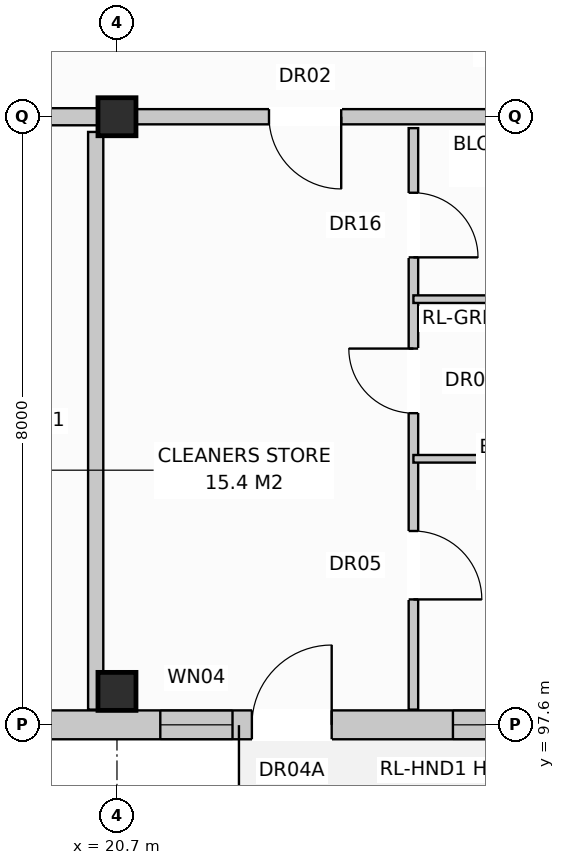
"""IFC4 building model, lengths in metres.
Left out: names, types, materials, properties, quantities, classifications, styles, units other than length and angle.
Written with IfcOpenShell. Run it as: python <this file> out.ifc"""

import sys

from ifc_helpers import new_model, si_unit, direction, frame, frame_2d, origin, origin_with_axes, origin_2d, place, context, subcontext, project, spatial, rectangle, extrude, element, fill, save


model = new_model("IFC4")
c1 = context("Model", 3, precision=1e-05, world=origin(), true_north=direction((0.0, 1.0)))
c2 = subcontext(c1, "Body", "Model", "MODEL_VIEW")
j1 = project(units=[si_unit("LENGTHUNIT", "METRE"), si_unit("PLANEANGLEUNIT", "RADIAN")], contexts=[c1])
p1 = place(None, origin())
s1 = spatial("IfcSite", under=j1, at=p1, CompositionType="ELEMENT")
p2 = place(p1, origin())
s2 = spatial("IfcBuilding", under=s1, at=p2, CompositionType="ELEMENT")
p3 = place(p2, frame((0.0, 0.0, 4.4)))
s3 = spatial("IfcBuildingStorey", under=s2, at=p3, CompositionType="ELEMENT", Elevation=4.4)
for number, where, z_axis, x_axis in (
    (1, (20.7, 98.04, 0.0), (0.0, 0.0, 1.0), (1.0, 0.0, 0.0)),
    (2, (20.7, 105.6, 0.0), (0.0, 0.0, 1.0), (1.0, 0.0, 0.0)),
):
    element("IfcColumn", number, at=place(p3, frame(where, z_axis=z_axis, x_axis=x_axis)), inside=s3, PredefinedType="COLUMN", context=c2, shape_type="SweptSolid", body=[
        extrude(rectangle(XDim=0.5, YDim=0.5, at=origin_2d()), origin(), (0.0, 0.0, 1.0), 3.6),
    ])
p4 = place(p3, frame((10.65, 97.6, 0.0), z_axis=(0.0, 0.0, 1.0), x_axis=(1.0, 0.0, 0.0)))
e3 = element("IfcWall", 3, at=p4, inside=s3, PredefinedType="STANDARD", context=c2, shape_type="SweptSolid", body=[
    extrude(rectangle(XDim=17.4, YDim=0.38, at=frame_2d((8.7, 0.0))), origin(), (0.0, 0.0, 1.0), 3.33),
])
p5 = place(p4, frame((11.825, 0.0, 0.0)))
e4 = element("IfcOpeningElement", 4, at=p5, cuts=e3, PredefinedType="OPENING", context=c2, shape_type="SweptSolid", body=[
    extrude(rectangle(XDim=1.05, YDim=2.12, at=frame_2d((0.525, 1.06))), frame((0.0, 0.202, 0.0), z_axis=(0.0, -1.0, 0.0), x_axis=(1.0, 0.0, 0.0)), (0.0, 0.0, 1.0), 0.404),
])
p6 = place(p4, frame((10.62, 0.0, 0.9)))
e5 = element("IfcOpeningElement", 5, at=p6, cuts=e3, PredefinedType="OPENING", context=c2, shape_type="SweptSolid", body=[
    extrude(rectangle(XDim=0.95, YDim=1.55, at=frame_2d((0.475, 0.775))), frame((0.0, 0.202, 0.0), z_axis=(0.0, -1.0, 0.0), x_axis=(1.0, 0.0, 0.0)), (0.0, 0.0, 1.0), 0.404),
])
p7 = place(p4, frame((14.47, 0.0, 0.8)))
e6 = element("IfcOpeningElement", 6, at=p7, cuts=e3, PredefinedType="OPENING", context=c2, shape_type="SweptSolid", body=[
    extrude(rectangle(XDim=1.9, YDim=1.85, at=frame_2d((0.95, 0.925))), frame((0.0, 0.202, 0.0), z_axis=(0.0, -1.0, 0.0), x_axis=(1.0, 0.0, 0.0)), (0.0, 0.0, 1.0), 0.404),
])
p8 = place(p3, frame((20.42, 97.8, 0.0), z_axis=(0.0, 0.0, 1.0), x_axis=(0.0, 1.0, 0.0)))
e7 = element("IfcWall", 7, at=p8, inside=s3, PredefinedType="PARTITIONING", context=c2, shape_type="SweptSolid", body=[
    extrude(rectangle(XDim=7.6, YDim=0.2, at=frame_2d((3.8, 0.0))), origin(), (0.0, 0.0, 1.0), 3.33),
])
p9 = place(p3, frame((10.8, 105.6, 0.0), z_axis=(0.0, 0.0, 1.0), x_axis=(1.0, 0.0, 0.0)))
e8 = element("IfcWall", 8, at=p9, inside=s3, PredefinedType="PARTITIONING", context=c2, shape_type="SweptSolid", body=[
    extrude(rectangle(XDim=9.9, YDim=0.225, at=frame_2d((4.95, 0.0))), origin(), (0.0, 0.0, 1.0), 2.77),
])
p10 = place(p9, frame((0.475, 0.0, 0.0)))
e9 = element("IfcOpeningElement", 9, at=p10, cuts=e8, PredefinedType="OPENING", context=c2, shape_type="SweptSolid", body=[
    extrude(rectangle(XDim=1.1, YDim=2.15, at=frame_2d((0.55, 1.075))), frame((0.0, 0.125, 0.0), z_axis=(0.0, -1.0, 0.0), x_axis=(1.0, 0.0, 0.0)), (0.0, 0.0, 1.0), 0.249),
])
p11 = place(p9, frame((5.75, 0.0, 0.0)))
e10 = element("IfcOpeningElement", 10, at=p11, cuts=e8, PredefinedType="OPENING", context=c2, shape_type="SweptSolid", body=[
    extrude(rectangle(XDim=0.9, YDim=2.1, at=frame_2d((0.45, 1.05))), frame((0.0, 0.125, 0.0), z_axis=(0.0, -1.0, 0.0), x_axis=(1.0, 0.0, 0.0)), (0.0, 0.0, 1.0), 0.249),
])
p12 = place(p9, frame((7.8, 0.0, 0.0)))
e11 = element("IfcOpeningElement", 11, at=p12, cuts=e8, PredefinedType="OPENING", context=c2, shape_type="SweptSolid", body=[
    extrude(rectangle(XDim=0.95, YDim=2.15, at=frame_2d((0.475, 1.075))), frame((0.0, 0.125, 0.0), z_axis=(0.0, -1.0, 0.0), x_axis=(1.0, 0.0, 0.0)), (0.0, 0.0, 1.0), 0.249),
])
p13 = place(p3, frame((20.7, 105.6, 0.0), z_axis=(0.0, 0.0, 1.0), x_axis=(1.0, 0.0, 0.0)))
e12 = element("IfcWall", 12, at=p13, inside=s3, PredefinedType="PARTITIONING", context=c2, shape_type="SweptSolid", body=[
    extrude(rectangle(XDim=6.9, YDim=0.2, at=frame_2d((3.45, 0.0))), origin(), (0.0, 0.0, 1.0), 2.77),
])
p14 = place(p13, frame((2.0, 0.0, 0.0)))
e13 = element("IfcOpeningElement", 13, at=p14, cuts=e12, PredefinedType="OPENING", context=c2, shape_type="SweptSolid", body=[
    extrude(rectangle(XDim=0.95, YDim=2.15, at=frame_2d((0.475, 1.075))), frame((0.0, 0.112, 0.0), z_axis=(0.0, -1.0, 0.0), x_axis=(1.0, 0.0, 0.0)), (0.0, 0.0, 1.0), 0.224),
])
p15 = place(p3, frame((24.6, 105.45, 0.0), z_axis=(0.0, 0.0, 1.0), x_axis=(0.0, -1.0, 0.0)))
e14 = element("IfcWall", 14, at=p15, inside=s3, PredefinedType="PARTITIONING", context=c2, shape_type="SweptSolid", body=[
    extrude(rectangle(XDim=7.65, YDim=0.125, at=frame_2d((3.825, 0.0))), origin(), (0.0, 0.0, 1.0), 2.99),
])
p16 = place(p15, frame((0.85, 0.0, 0.0)))
e15 = element("IfcOpeningElement", 15, at=p16, cuts=e14, PredefinedType="OPENING", context=c2, shape_type="SweptSolid", body=[
    extrude(rectangle(XDim=0.85, YDim=2.1, at=frame_2d((0.425, 1.05))), frame((0.0, 0.074, 0.0), z_axis=(0.0, -1.0, 0.0), x_axis=(1.0, 0.0, 0.0)), (0.0, 0.0, 1.0), 0.149),
])
p17 = place(p15, frame((2.9, 0.0, 0.0)))
e16 = element("IfcOpeningElement", 16, at=p17, cuts=e14, PredefinedType="OPENING", context=c2, shape_type="SweptSolid", body=[
    extrude(rectangle(XDim=0.85, YDim=2.05, at=frame_2d((0.425, 1.025))), frame((0.0, 0.074, 0.0), z_axis=(0.0, -1.0, 0.0), x_axis=(1.0, 0.0, 0.0)), (0.0, 0.0, 1.0), 0.149),
])
p18 = place(p15, frame((5.3, 0.0, 0.0)))
e17 = element("IfcOpeningElement", 17, at=p18, cuts=e14, PredefinedType="OPENING", context=c2, shape_type="SweptSolid", body=[
    extrude(rectangle(XDim=0.9, YDim=2.1, at=frame_2d((0.45, 1.05))), frame((0.0, 0.074, 0.0), z_axis=(0.0, -1.0, 0.0), x_axis=(1.0, 0.0, 0.0)), (0.0, 0.0, 1.0), 0.149),
])
for number, where, z_axis, x_axis in (
    (18, (24.6, 103.2, 0.0), (0.0, 0.0, 1.0), (1.0, 0.0, 0.0)),
    (19, (24.6, 101.1, 0.0), (0.0, 0.0, 1.0), (1.0, 0.0, 0.0)),
):
    element("IfcWall", number, at=place(p3, frame(where, z_axis=z_axis, x_axis=x_axis)), inside=s3, PredefinedType="PARTITIONING", context=c2, shape_type="SweptSolid", body=[
        extrude(rectangle(XDim=2.9, YDim=0.1, at=frame_2d((1.45, 0.0))), origin(), (0.0, 0.0, 1.0), 3.33),
    ])
p19 = place(p5, origin_with_axes())
e20 = element("IfcDoor", 20, at=p19, inside=s3, OperationType="SINGLE_SWING_RIGHT", PredefinedType="DOOR", context=c2, shape_type="SweptSolid", body=[
    extrude(rectangle(XDim=1.05, YDim=2.12, at=frame_2d((0.525, 1.06))), frame((0.0, 0.025, 0.0), z_axis=(0.0, -1.0, 0.0), x_axis=(1.0, 0.0, 0.0)), (0.0, 0.0, 1.0), 0.05),
])
fill(e4, e20)
p20 = place(p6, origin_with_axes())
e21 = element("IfcWindow", 21, at=p20, inside=s3, PartitioningType="SINGLE_PANEL", PredefinedType="WINDOW", context=c2, shape_type="SweptSolid", body=[
    extrude(rectangle(XDim=0.95, YDim=1.55, at=frame_2d((0.475, 0.775))), frame((0.0, 0.03, 0.0), z_axis=(0.0, -1.0, 0.0), x_axis=(1.0, 0.0, 0.0)), (0.0, 0.0, 1.0), 0.06),
])
fill(e5, e21)
p21 = place(p7, origin_with_axes())
e22 = element("IfcWindow", 22, at=p21, inside=s3, PartitioningType="SINGLE_PANEL", PredefinedType="WINDOW", context=c2, shape_type="SweptSolid", body=[
    extrude(rectangle(XDim=1.9, YDim=1.85, at=frame_2d((0.95, 0.925))), frame((0.0, 0.03, 0.0), z_axis=(0.0, -1.0, 0.0), x_axis=(1.0, 0.0, 0.0)), (0.0, 0.0, 1.0), 0.06),
])
fill(e6, e22)
p22 = place(p14, frame((0.95, 0.0, 0.0), z_axis=(0.0, 0.0, 1.0), x_axis=(-1.0, 0.0, 0.0)))
e23 = element("IfcDoor", 23, at=p22, inside=s3, OperationType="SINGLE_SWING_RIGHT", PredefinedType="DOOR", context=c2, shape_type="SweptSolid", body=[
    extrude(rectangle(XDim=0.95, YDim=2.15, at=frame_2d((0.475, 1.075))), frame((0.0, 0.025, 0.0), z_axis=(0.0, -1.0, 0.0), x_axis=(1.0, 0.0, 0.0)), (0.0, 0.0, 1.0), 0.05),
])
fill(e13, e23)
p23 = place(p16, origin_with_axes())
e24 = element("IfcDoor", 24, at=p23, inside=s3, OperationType="SINGLE_SWING_RIGHT", PredefinedType="DOOR", context=c2, shape_type="SweptSolid", body=[
    extrude(rectangle(XDim=0.85, YDim=2.1, at=frame_2d((0.425, 1.05))), frame((0.0, 0.025, 0.0), z_axis=(0.0, -1.0, 0.0), x_axis=(1.0, 0.0, 0.0)), (0.0, 0.0, 1.0), 0.05),
])
fill(e15, e24)
p24 = place(p17, frame((0.85, 0.0, 0.0), z_axis=(0.0, 0.0, 1.0), x_axis=(-1.0, 0.0, 0.0)))
e25 = element("IfcDoor", 25, at=p24, inside=s3, OperationType="SINGLE_SWING_LEFT", PredefinedType="DOOR", context=c2, shape_type="SweptSolid", body=[
    extrude(rectangle(XDim=0.85, YDim=2.05, at=frame_2d((0.425, 1.025))), frame((0.0, 0.025, 0.0), z_axis=(0.0, -1.0, 0.0), x_axis=(1.0, 0.0, 0.0)), (0.0, 0.0, 1.0), 0.05),
])
fill(e16, e25)
p25 = place(p18, origin_with_axes())
e26 = element("IfcDoor", 26, at=p25, inside=s3, OperationType="SINGLE_SWING_RIGHT", PredefinedType="DOOR", context=c2, shape_type="SweptSolid", body=[
    extrude(rectangle(XDim=0.9, YDim=2.1, at=frame_2d((0.45, 1.05))), frame((0.0, 0.025, 0.0), z_axis=(0.0, -1.0, 0.0), x_axis=(1.0, 0.0, 0.0)), (0.0, 0.0, 1.0), 0.05),
])
fill(e17, e26)
save(model, sys.argv[1])
